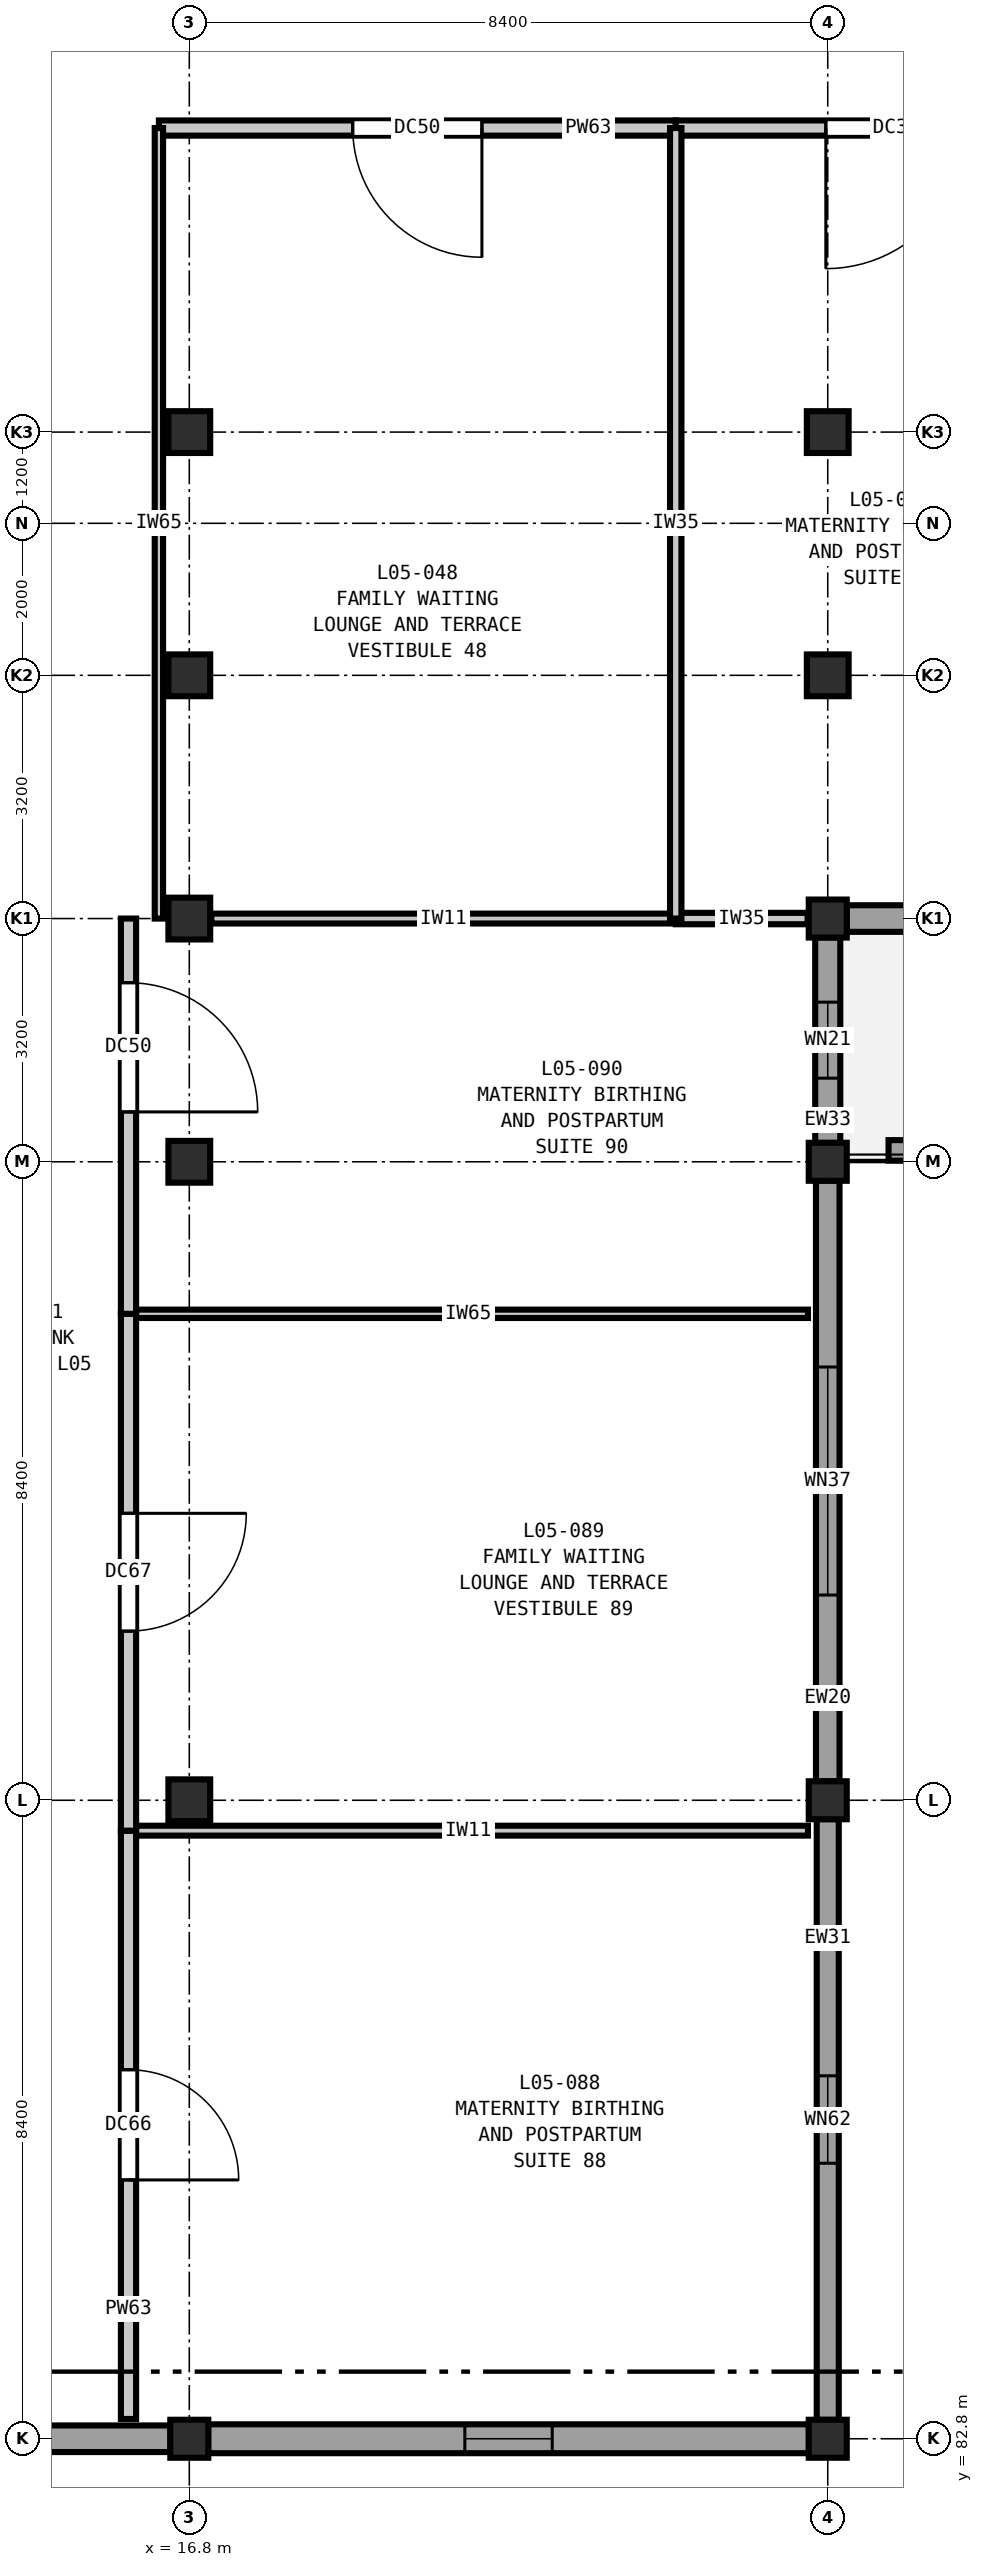
"""IFC4 building model, lengths in metres.
Left out: names, types, materials, properties, quantities, classifications, styles, units other than length and angle.
Written with IfcOpenShell. Run it as: python <this file> out.ifc"""

import sys

from ifc_helpers import new_model, si_unit, direction, frame, frame_2d, origin, origin_2d, place, context, subcontext, project, spatial, rectangle, extrude, element, fill, save


model = new_model("IFC4")
c1 = context("Model", 3, precision=1e-05, world=origin(), true_north=direction((0.0, 1.0)))
c2 = subcontext(c1, "Body", "Model", "MODEL_VIEW")
j1 = project(units=[si_unit("LENGTHUNIT", "METRE"), si_unit("PLANEANGLEUNIT", "RADIAN")], contexts=[c1])
p1 = place(None, origin())
s1 = spatial("IfcSite", under=j1, at=p1, CompositionType="ELEMENT")
p2 = place(p1, origin())
s2 = spatial("IfcBuilding", under=s1, at=p2, CompositionType="ELEMENT")
p3 = place(p2, frame((0.0, 0.0, 24.6)))
s3 = spatial("IfcBuildingStorey", under=s2, at=p3, CompositionType="ELEMENT", Elevation=24.6)
p4 = place(p3, frame((16.8, 82.8, 0.0), z_axis=(0.0, 0.0, 1.0), x_axis=(1.0, 0.0, 0.0)))
e1 = element("IfcColumn", 1, at=p4, inside=s3, PredefinedType="COLUMN", context=c2, shape_type="SweptSolid", body=[
    extrude(rectangle(XDim=0.5, YDim=0.5, at=origin_2d()), origin(), (0.0, 0.0, 1.0), 4.2),
])
for number, where, z_axis, x_axis in (
    (2, (16.8, 91.2, 0.0), (0.0, 0.0, 1.0), (1.0, 0.0, 0.0)),
    (3, (16.8, 99.6, 0.0), (0.0, 0.0, 1.0), (1.0, 0.0, 0.0)),
    (4, (16.8, 102.8, 0.0), (0.0, 0.0, 1.0), (1.0, 0.0, 0.0)),
    (5, (16.8, 106.0, 0.0), (0.0, 0.0, 1.0), (1.0, 0.0, 0.0)),
    (6, (16.8, 109.2, 0.0), (0.0, 0.0, 1.0), (1.0, 0.0, 0.0)),
):
    element("IfcColumn", number, at=place(p3, frame(where, z_axis=z_axis, x_axis=x_axis)), inside=s3, PredefinedType="COLUMN", context=c2, shape_type="SweptSolid", body=[
        extrude(rectangle(XDim=0.55, YDim=0.55, at=origin_2d()), origin(), (0.0, 0.0, 1.0), 4.2),
    ])
for number, where, z_axis, x_axis in (
    (7, (25.2, 82.8, 0.0), (0.0, 0.0, 1.0), (1.0, 0.0, 0.0)),
    (8, (25.2, 91.2, 0.0), (0.0, 0.0, 1.0), (1.0, 0.0, 0.0)),
    (9, (25.2, 99.6, 0.0), (0.0, 0.0, 1.0), (1.0, 0.0, 0.0)),
    (10, (25.2, 102.8, 0.0), (0.0, 0.0, 1.0), (1.0, 0.0, 0.0)),
):
    element("IfcColumn", number, at=place(p3, frame(where, z_axis=z_axis, x_axis=x_axis)), inside=s3, PredefinedType="COLUMN", context=c2, shape_type="SweptSolid", body=[
        extrude(rectangle(XDim=0.5, YDim=0.5, at=origin_2d()), origin(), (0.0, 0.0, 1.0), 4.2),
    ])
for number, where, z_axis, x_axis in (
    (11, (25.2, 106.0, 0.0), (0.0, 0.0, 1.0), (1.0, 0.0, 0.0)),
    (12, (25.2, 109.2, 0.0), (0.0, 0.0, 1.0), (1.0, 0.0, 0.0)),
):
    element("IfcColumn", number, at=place(p3, frame(where, z_axis=z_axis, x_axis=x_axis)), inside=s3, PredefinedType="COLUMN", context=c2, shape_type="SweptSolid", body=[
        extrude(rectangle(XDim=0.55, YDim=0.55, at=origin_2d()), origin(), (0.0, 0.0, 1.0), 4.2),
    ])
p5 = place(p3, frame((33.352, 102.8, 0.0), z_axis=(0.0, 0.0, 1.0), x_axis=(-1.0, 0.0, 0.0)))
e13 = element("IfcWall", 13, at=p5, inside=s3, PredefinedType="SOLIDWALL", context=c2, shape_type="SweptSolid", body=[
    extrude(rectangle(XDim=7.904, YDim=0.35, at=frame_2d((3.952, 0.0))), origin(), (0.0, 0.0, 1.0), 3.48),
])
p6 = place(p3, frame((25.2, 102.552, 0.0), z_axis=(0.0, 0.0, 1.0), x_axis=(0.0, -1.0, 0.0)))
e14 = element("IfcWall", 14, at=p6, inside=s3, PredefinedType="SOLIDWALL", context=c2, shape_type="SweptSolid", body=[
    extrude(rectangle(XDim=2.704, YDim=0.33, at=frame_2d((1.352, 0.0))), origin(), (0.0, 0.0, 1.0), 3.48),
])
p7 = place(p6, frame((0.852, 0.0, 0.9)))
e15 = element("IfcOpeningElement", 15, at=p7, cuts=e14, PredefinedType="OPENING", context=c2, shape_type="SweptSolid", body=[
    extrude(rectangle(XDim=1.0, YDim=1.55, at=frame_2d((0.5, 0.775))), frame((0.0, 0.175, 0.0), z_axis=(0.0, -1.0, 0.0), x_axis=(1.0, 0.0, 0.0)), (0.0, 0.0, 1.0), 0.35),
])
p8 = place(p3, frame((25.2, 99.352, 0.0), z_axis=(0.0, 0.0, 1.0), x_axis=(0.0, -1.0, 0.0)))
e16 = element("IfcWall", 16, at=p8, inside=s3, PredefinedType="SOLIDWALL", context=c2, shape_type="SweptSolid", body=[
    extrude(rectangle(XDim=7.904, YDim=0.31, at=frame_2d((3.952, 0.0))), origin(), (0.0, 0.0, 1.0), 3.48),
])
p9 = place(p8, frame((2.452, 0.0, 0.9)))
e17 = element("IfcOpeningElement", 17, at=p9, cuts=e16, PredefinedType="OPENING", context=c2, shape_type="SweptSolid", body=[
    extrude(rectangle(XDim=3.0, YDim=2.15, at=frame_2d((1.5, 1.075))), frame((0.0, 0.165, 0.0), z_axis=(0.0, -1.0, 0.0), x_axis=(1.0, 0.0, 0.0)), (0.0, 0.0, 1.0), 0.33),
])
p10 = place(p3, frame((25.2, 90.952, 0.0), z_axis=(0.0, 0.0, 1.0), x_axis=(0.0, -1.0, 0.0)))
e18 = element("IfcWall", 18, at=p10, inside=s3, PredefinedType="SOLIDWALL", context=c2, shape_type="SweptSolid", body=[
    extrude(rectangle(XDim=7.904, YDim=0.29, at=frame_2d((3.952, 0.0))), origin(), (0.0, 0.0, 1.0), 3.48),
])
p11 = place(p10, frame((3.377, 0.0, 0.9)))
e19 = element("IfcOpeningElement", 19, at=p11, cuts=e18, PredefinedType="OPENING", context=c2, shape_type="SweptSolid", body=[
    extrude(rectangle(XDim=1.15, YDim=1.4, at=frame_2d((0.575, 0.7))), frame((0.0, 0.155, 0.0), z_axis=(0.0, -1.0, 0.0), x_axis=(1.0, 0.0, 0.0)), (0.0, 0.0, 1.0), 0.31),
])
p12 = place(p3, frame((24.952, 82.8, 0.0), z_axis=(0.0, 0.0, 1.0), x_axis=(-1.0, 0.0, 0.0)))
e20 = element("IfcWall", 20, at=p12, inside=s3, PredefinedType="SOLIDWALL", context=c2, shape_type="SweptSolid", body=[
    extrude(rectangle(XDim=7.904, YDim=0.38, at=frame_2d((3.952, 0.0))), origin(), (0.0, 0.0, 1.0), 3.48),
])
p13 = place(p12, frame((3.377, 0.0, 0.9)))
e21 = element("IfcOpeningElement", 21, at=p13, cuts=e20, PredefinedType="OPENING", context=c2, shape_type="SweptSolid", body=[
    extrude(rectangle(XDim=1.15, YDim=1.4, at=frame_2d((0.575, 0.7))), frame((0.0, 0.2, 0.0), z_axis=(0.0, -1.0, 0.0), x_axis=(1.0, 0.0, 0.0)), (0.0, 0.0, 1.0), 0.4),
])
p14 = place(p3, frame((16.552, 82.8, 0.0), z_axis=(0.0, 0.0, 1.0), x_axis=(-1.0, 0.0, 0.0)))
e22 = element("IfcWall", 22, at=p14, inside=s3, PredefinedType="SOLIDWALL", context=c2, shape_type="SweptSolid", body=[
    extrude(rectangle(XDim=7.904, YDim=0.35, at=frame_2d((3.952, 0.0))), origin(), (0.0, 0.0, 1.0), 3.48),
])
p15 = place(p14, frame((4.665, 0.0, 0.9)))
e23 = element("IfcOpeningElement", 23, at=p15, cuts=e22, PredefinedType="OPENING", context=c2, shape_type="SweptSolid", body=[
    extrude(rectangle(XDim=1.15, YDim=1.4, at=frame_2d((0.575, 0.7))), frame((0.0, 0.185, 0.0), z_axis=(0.0, -1.0, 0.0), x_axis=(1.0, 0.0, 0.0)), (0.0, 0.0, 1.0), 0.37),
])
p16 = place(p3, frame((26.0, 99.75, 0.0), z_axis=(0.0, 0.0, 1.0), x_axis=(1.0, 0.0, 0.0)))
e24 = element("IfcWall", 24, at=p16, inside=s3, PredefinedType="PARAPET", context=c2, shape_type="SweptSolid", body=[
    extrude(rectangle(XDim=7.0, YDim=0.27, at=frame_2d((3.5, 0.0))), origin(), (0.0, 0.0, 1.0), 0.95),
])
p17 = place(p3, frame((16.0, 90.8, 0.0), z_axis=(0.0, 0.0, 1.0), x_axis=(1.0, 0.0, 0.0)))
e25 = element("IfcWall", 25, at=p17, inside=s3, PredefinedType="PARTITIONING", context=c2, shape_type="SweptSolid", body=[
    extrude(rectangle(XDim=8.94, YDim=0.13, at=frame_2d((4.47, 0.0))), origin(), (0.0, 0.0, 1.0), 3.92),
])
p18 = place(p3, frame((16.0, 97.6, 0.0), z_axis=(0.0, 0.0, 1.0), x_axis=(1.0, 0.0, 0.0)))
e26 = element("IfcWall", 26, at=p18, inside=s3, PredefinedType="PARTITIONING", context=c2, shape_type="SweptSolid", body=[
    extrude(rectangle(XDim=8.94, YDim=0.11, at=frame_2d((4.47, 0.0))), origin(), (0.0, 0.0, 1.0), 3.92),
])
p19 = place(p3, frame((17.09, 102.8, 0.0), z_axis=(0.0, 0.0, 1.0), x_axis=(1.0, 0.0, 0.0)))
e27 = element("IfcWall", 27, at=p19, inside=s3, PredefinedType="PARTITIONING", context=c2, shape_type="SweptSolid", body=[
    extrude(rectangle(XDim=6.11, YDim=0.13, at=frame_2d((3.055, 0.0))), origin(), (0.0, 0.0, 1.0), 3.585),
])
p20 = place(p3, frame((23.2, 102.8, 0.0), z_axis=(0.0, 0.0, 1.0), x_axis=(1.0, 0.0, 0.0)))
e28 = element("IfcWall", 28, at=p20, inside=s3, PredefinedType="PARTITIONING", context=c2, shape_type="SweptSolid", body=[
    extrude(rectangle(XDim=1.735, YDim=0.15, at=frame_2d((0.868, 0.0))), origin(), (0.0, 0.0, 1.0), 3.585),
])
p21 = place(p3, frame((16.4, 113.2, 0.0), z_axis=(0.0, 0.0, 1.0), x_axis=(1.0, 0.0, 0.0)))
e29 = element("IfcWall", 29, at=p21, inside=s3, PredefinedType="PARTITIONING", context=c2, shape_type="SweptSolid", body=[
    extrude(rectangle(XDim=6.8, YDim=0.2, at=frame_2d((3.4, 0.0))), origin(), (0.0, 0.0, 1.0), 3.92),
])
p22 = place(p21, frame((2.55, 0.0, 0.0)))
e30 = element("IfcOpeningElement", 30, at=p22, cuts=e29, PredefinedType="OPENING", context=c2, shape_type="SweptSolid", body=[
    extrude(rectangle(XDim=1.7, YDim=2.3, at=frame_2d((0.85, 1.15))), frame((0.0, 0.11, 0.0), z_axis=(0.0, -1.0, 0.0), x_axis=(1.0, 0.0, 0.0)), (0.0, 0.0, 1.0), 0.22),
])
p23 = place(p3, frame((23.2, 113.2, 0.0), z_axis=(0.0, 0.0, 1.0), x_axis=(1.0, 0.0, 0.0)))
e31 = element("IfcWall", 31, at=p23, inside=s3, PredefinedType="PARTITIONING", context=c2, shape_type="SweptSolid", body=[
    extrude(rectangle(XDim=5.8, YDim=0.2, at=frame_2d((2.9, 0.0))), origin(), (0.0, 0.0, 1.0), 3.92),
])
p24 = place(p23, frame((1.975, 0.0, 0.0)))
e32 = element("IfcOpeningElement", 32, at=p24, cuts=e31, PredefinedType="OPENING", context=c2, shape_type="SweptSolid", body=[
    extrude(rectangle(XDim=1.85, YDim=2.3, at=frame_2d((0.925, 1.15))), frame((0.0, 0.11, 0.0), z_axis=(0.0, -1.0, 0.0), x_axis=(1.0, 0.0, 0.0)), (0.0, 0.0, 1.0), 0.22),
])
p25 = place(p3, frame((16.0, 83.06, 0.0), z_axis=(0.0, 0.0, 1.0), x_axis=(0.0, 1.0, 0.0)))
e33 = element("IfcWall", 33, at=p25, inside=s3, PredefinedType="PARTITIONING", context=c2, shape_type="SweptSolid", body=[
    extrude(rectangle(XDim=7.74, YDim=0.2, at=frame_2d((3.87, 0.0))), origin(), (0.0, 0.0, 1.0), 3.92),
])
p26 = place(p25, frame((3.145, 0.0, 0.0)))
e34 = element("IfcOpeningElement", 34, at=p26, cuts=e33, PredefinedType="OPENING", context=c2, shape_type="SweptSolid", body=[
    extrude(rectangle(XDim=1.45, YDim=2.25, at=frame_2d((0.725, 1.125))), frame((0.0, 0.11, 0.0), z_axis=(0.0, -1.0, 0.0), x_axis=(1.0, 0.0, 0.0)), (0.0, 0.0, 1.0), 0.22),
])
p27 = place(p3, frame((16.0, 90.8, 0.0), z_axis=(0.0, 0.0, 1.0), x_axis=(0.0, 1.0, 0.0)))
e35 = element("IfcWall", 35, at=p27, inside=s3, PredefinedType="PARTITIONING", context=c2, shape_type="SweptSolid", body=[
    extrude(rectangle(XDim=6.8, YDim=0.2, at=frame_2d((3.4, 0.0))), origin(), (0.0, 0.0, 1.0), 3.92),
])
p28 = place(p27, frame((2.625, 0.0, 0.0)))
e36 = element("IfcOpeningElement", 36, at=p28, cuts=e35, PredefinedType="OPENING", context=c2, shape_type="SweptSolid", body=[
    extrude(rectangle(XDim=1.55, YDim=2.25, at=frame_2d((0.775, 1.125))), frame((0.0, 0.11, 0.0), z_axis=(0.0, -1.0, 0.0), x_axis=(1.0, 0.0, 0.0)), (0.0, 0.0, 1.0), 0.22),
])
p29 = place(p3, frame((16.0, 97.6, 0.0), z_axis=(0.0, 0.0, 1.0), x_axis=(0.0, 1.0, 0.0)))
e37 = element("IfcWall", 37, at=p29, inside=s3, PredefinedType="PARTITIONING", context=c2, shape_type="SweptSolid", body=[
    extrude(rectangle(XDim=5.2, YDim=0.2, at=frame_2d((2.6, 0.0))), origin(), (0.0, 0.0, 1.0), 3.92),
])
p30 = place(p29, frame((2.656, 0.0, 0.0)))
e38 = element("IfcOpeningElement", 38, at=p30, cuts=e37, PredefinedType="OPENING", context=c2, shape_type="SweptSolid", body=[
    extrude(rectangle(XDim=1.7, YDim=2.3, at=frame_2d((0.85, 1.15))), frame((0.0, 0.11, 0.0), z_axis=(0.0, -1.0, 0.0), x_axis=(1.0, 0.0, 0.0)), (0.0, 0.0, 1.0), 0.22),
])
p31 = place(p3, frame((16.4, 102.8, 0.0), z_axis=(0.0, 0.0, 1.0), x_axis=(0.0, 1.0, 0.0)))
e39 = element("IfcWall", 39, at=p31, inside=s3, PredefinedType="PARTITIONING", context=c2, shape_type="SweptSolid", body=[
    extrude(rectangle(XDim=10.4, YDim=0.11, at=frame_2d((5.2, 0.0))), origin(), (0.0, 0.0, 1.0), 3.92),
])
p32 = place(p3, frame((23.2, 102.8, 0.0), z_axis=(0.0, 0.0, 1.0), x_axis=(0.0, 1.0, 0.0)))
e40 = element("IfcWall", 40, at=p32, inside=s3, PredefinedType="PARTITIONING", context=c2, shape_type="SweptSolid", body=[
    extrude(rectangle(XDim=10.4, YDim=0.15, at=frame_2d((5.2, 0.0))), origin(), (0.0, 0.0, 1.0), 3.92),
])
p33 = place(p7, origin())
e41 = element("IfcWindow", 41, at=p33, inside=s3, PartitioningType="SINGLE_PANEL", PredefinedType="WINDOW", context=c2, shape_type="SweptSolid", body=[
    extrude(rectangle(XDim=1.0, YDim=1.55, at=frame_2d((0.5, 0.775))), frame((0.0, 0.03, 0.0), z_axis=(0.0, -1.0, 0.0), x_axis=(1.0, 0.0, 0.0)), (0.0, 0.0, 1.0), 0.06),
])
fill(e15, e41)
p34 = place(p9, origin())
e42 = element("IfcWindow", 42, at=p34, inside=s3, PartitioningType="DOUBLE_PANEL_VERTICAL", PredefinedType="WINDOW", context=c2, shape_type="SweptSolid", body=[
    extrude(rectangle(XDim=3.0, YDim=2.15, at=frame_2d((1.5, 1.075))), frame((0.0, 0.03, 0.0), z_axis=(0.0, -1.0, 0.0), x_axis=(1.0, 0.0, 0.0)), (0.0, 0.0, 1.0), 0.06),
])
fill(e17, e42)
p35 = place(p11, origin())
e43 = element("IfcWindow", 43, at=p35, inside=s3, PartitioningType="SINGLE_PANEL", PredefinedType="WINDOW", context=c2, shape_type="SweptSolid", body=[
    extrude(rectangle(XDim=1.15, YDim=1.4, at=frame_2d((0.575, 0.7))), frame((0.0, 0.03, 0.0), z_axis=(0.0, -1.0, 0.0), x_axis=(1.0, 0.0, 0.0)), (0.0, 0.0, 1.0), 0.06),
])
fill(e19, e43)
p36 = place(p13, origin())
e44 = element("IfcWindow", 44, at=p36, inside=s3, PartitioningType="SINGLE_PANEL", PredefinedType="WINDOW", context=c2, shape_type="SweptSolid", body=[
    extrude(rectangle(XDim=1.15, YDim=1.4, at=frame_2d((0.575, 0.7))), frame((0.0, 0.03, 0.0), z_axis=(0.0, -1.0, 0.0), x_axis=(1.0, 0.0, 0.0)), (0.0, 0.0, 1.0), 0.06),
])
fill(e21, e44)
p37 = place(p22, frame((1.7, 0.0, 0.0), z_axis=(0.0, 0.0, 1.0), x_axis=(-1.0, 0.0, 0.0)))
e45 = element("IfcDoor", 45, at=p37, inside=s3, OperationType="SINGLE_SWING_LEFT", PredefinedType="DOOR", context=c2, shape_type="SweptSolid", body=[
    extrude(rectangle(XDim=1.7, YDim=2.3, at=frame_2d((0.85, 1.15))), frame((0.0, 0.025, 0.0), z_axis=(0.0, -1.0, 0.0), x_axis=(1.0, 0.0, 0.0)), (0.0, 0.0, 1.0), 0.05),
])
fill(e30, e45)
p38 = place(p24, frame((1.85, 0.0, 0.0), z_axis=(0.0, 0.0, 1.0), x_axis=(-1.0, 0.0, 0.0)))
e46 = element("IfcDoor", 46, at=p38, inside=s3, OperationType="SINGLE_SWING_RIGHT", PredefinedType="DOOR", context=c2, shape_type="SweptSolid", body=[
    extrude(rectangle(XDim=1.85, YDim=2.3, at=frame_2d((0.925, 1.15))), frame((0.0, 0.025, 0.0), z_axis=(0.0, -1.0, 0.0), x_axis=(1.0, 0.0, 0.0)), (0.0, 0.0, 1.0), 0.05),
])
fill(e32, e46)
p39 = place(p26, frame((1.45, 0.0, 0.0), z_axis=(0.0, 0.0, 1.0), x_axis=(-1.0, 0.0, 0.0)))
e47 = element("IfcDoor", 47, at=p39, inside=s3, OperationType="SINGLE_SWING_RIGHT", PredefinedType="DOOR", context=c2, shape_type="SweptSolid", body=[
    extrude(rectangle(XDim=1.45, YDim=2.25, at=frame_2d((0.725, 1.125))), frame((0.0, 0.025, 0.0), z_axis=(0.0, -1.0, 0.0), x_axis=(1.0, 0.0, 0.0)), (0.0, 0.0, 1.0), 0.05),
])
fill(e34, e47)
p40 = place(p28, frame((1.55, 0.0, 0.0), z_axis=(0.0, 0.0, 1.0), x_axis=(-1.0, 0.0, 0.0)))
e48 = element("IfcDoor", 48, at=p40, inside=s3, OperationType="SINGLE_SWING_LEFT", PredefinedType="DOOR", context=c2, shape_type="SweptSolid", body=[
    extrude(rectangle(XDim=1.55, YDim=2.25, at=frame_2d((0.775, 1.125))), frame((0.0, 0.025, 0.0), z_axis=(0.0, -1.0, 0.0), x_axis=(1.0, 0.0, 0.0)), (0.0, 0.0, 1.0), 0.05),
])
fill(e36, e48)
p41 = place(p30, frame((1.7, 0.0, 0.0), z_axis=(0.0, 0.0, 1.0), x_axis=(-1.0, 0.0, 0.0)))
e49 = element("IfcDoor", 49, at=p41, inside=s3, OperationType="SINGLE_SWING_RIGHT", PredefinedType="DOOR", context=c2, shape_type="SweptSolid", body=[
    extrude(rectangle(XDim=1.7, YDim=2.3, at=frame_2d((0.85, 1.15))), frame((0.0, 0.025, 0.0), z_axis=(0.0, -1.0, 0.0), x_axis=(1.0, 0.0, 0.0)), (0.0, 0.0, 1.0), 0.05),
])
fill(e38, e49)
save(model, sys.argv[1])
